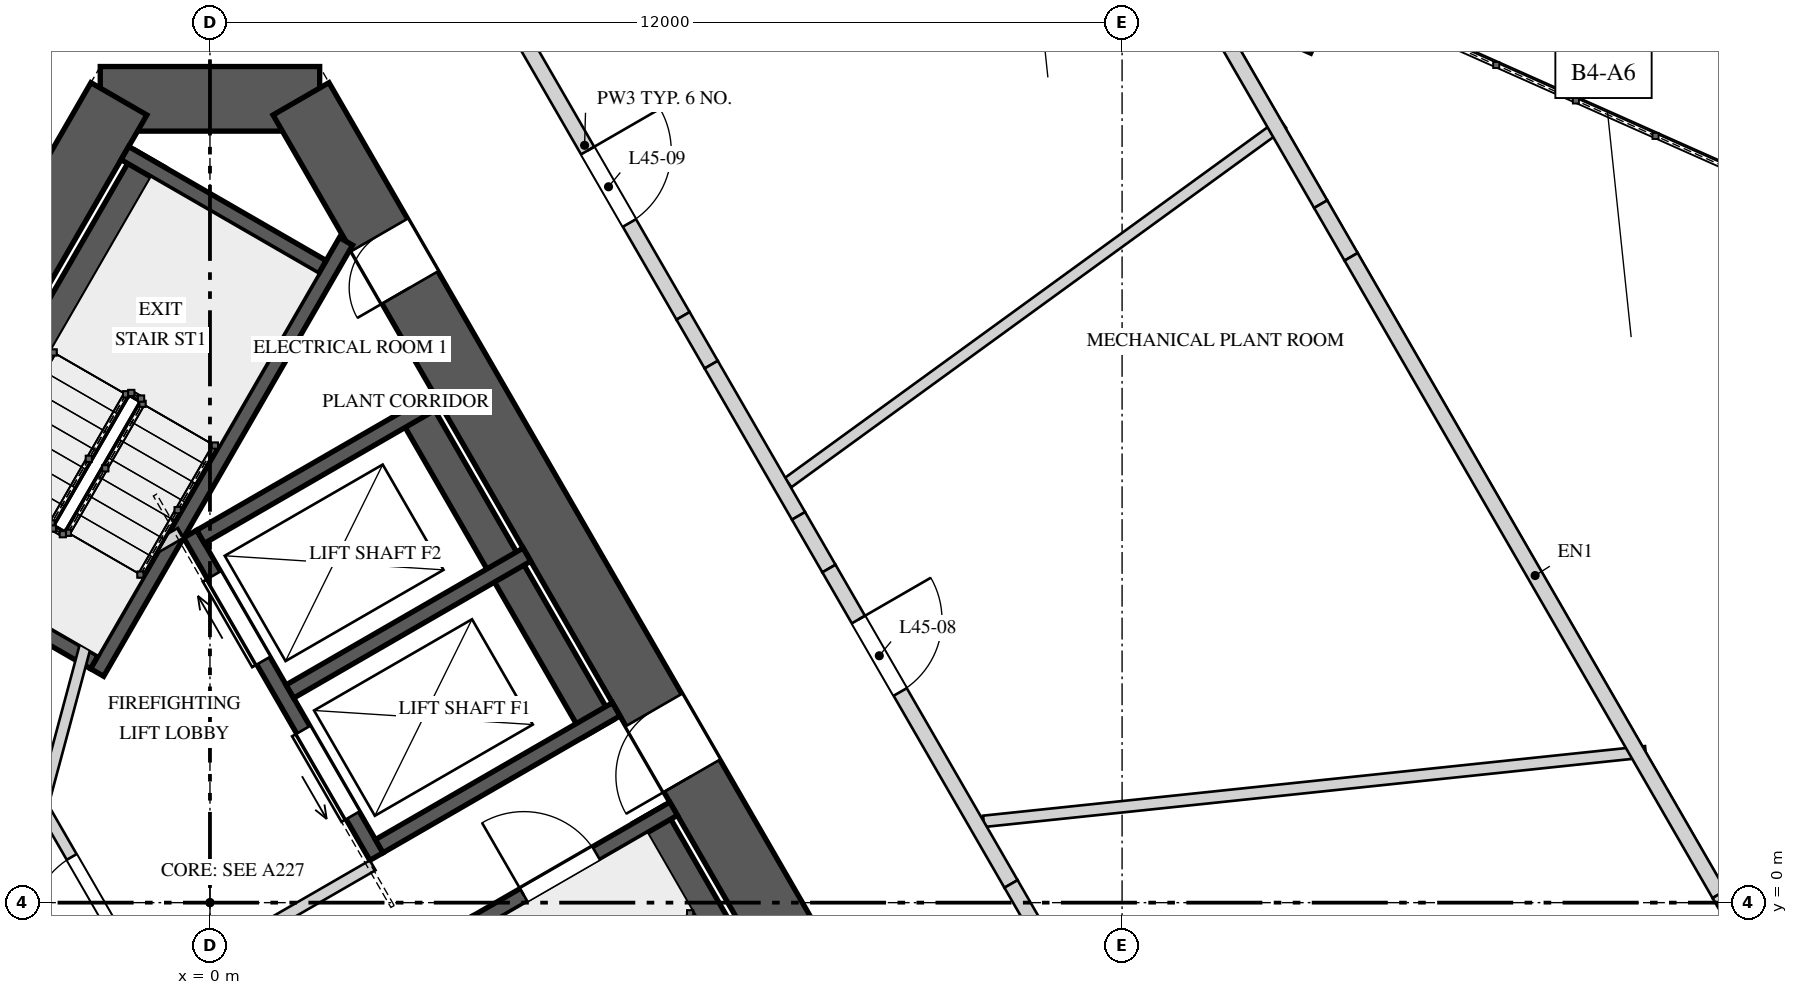
"""IFC4 building model, lengths in metres.
Left out: names, types, materials, properties, quantities, classifications, styles, units other than length and angle.
Written with IfcOpenShell. Run it as: python <this file> out.ifc"""

import sys

from ifc_helpers import new_model, si_unit, direction, frame, frame_2d, origin, origin_2d, place, context, subcontext, project, spatial, rectangle, extrude, element, fill, save


model = new_model("IFC4")
c1 = context("Model", 3, precision=1e-05, world=origin(), true_north=direction((0.0, 1.0)))
c2 = subcontext(c1, "Body", "Model", "MODEL_VIEW")
j1 = project(units=[si_unit("LENGTHUNIT", "METRE"), si_unit("PLANEANGLEUNIT", "RADIAN")], contexts=[c1])
p1 = place(None, origin())
s1 = spatial("IfcSite", under=j1, at=p1, CompositionType="ELEMENT")
p2 = place(p1, origin())
s2 = spatial("IfcBuilding", under=s1, at=p2, CompositionType="ELEMENT")
p3 = place(p2, frame((0.0, 0.0, 194.8)))
s3 = spatial("IfcBuildingStorey", under=s2, at=p3, CompositionType="ELEMENT", Elevation=194.8)
p4 = place(p3, frame((1.443, 10.575, 0.0), z_axis=(0.0, 0.0, 1.0), x_axis=(-1.0, 0.0, 0.0)))
e1 = element("IfcWall", 1, at=p4, inside=s3, PredefinedType="SHEAR", context=c2, shape_type="SweptSolid", body=[
    extrude(rectangle(XDim=2.887, YDim=0.85, at=frame_2d((1.443, 0.0))), origin(), (0.0, 0.0, 1.0), 5.2),
])
p5 = place(p3, frame((-1.198, 10.575, 0.0), z_axis=(0.0, 0.0, 1.0), x_axis=(-0.499995289315, -0.866028123483, 0.0)))
e2 = element("IfcWall", 2, at=p5, inside=s3, PredefinedType="SHEAR", context=c2, shape_type="SweptSolid", body=[
    extrude(rectangle(XDim=17.118, YDim=0.85, at=frame_2d((8.559, 0.0))), origin(), (0.0, 0.0, 1.0), 5.2),
])
p6 = place(p5, frame((6.764, 0.0, 0.0)))
e3 = element("IfcOpeningElement", 3, at=p6, cuts=e2, PredefinedType="OPENING", context=c2, shape_type="SweptSolid", body=[
    extrude(rectangle(XDim=1.0, YDim=2.4, at=frame_2d((0.5, 1.2))), frame((0.0, 0.435, 0.0), z_axis=(0.0, -1.0, 0.0), x_axis=(1.0, 0.0, 0.0)), (0.0, 0.0, 1.0), 0.87),
])
p7 = place(p3, frame((9.757, -4.25, 0.0), z_axis=(0.0, 0.0, 1.0), x_axis=(-0.499995289315, 0.866028123483, 0.0)))
e4 = element("IfcWall", 4, at=p7, inside=s3, PredefinedType="SHEAR", context=c2, shape_type="SweptSolid", body=[
    extrude(rectangle(XDim=17.118, YDim=0.85, at=frame_2d((8.559, 0.0))), origin(), (0.0, 0.0, 1.0), 5.2),
])
p8 = place(p7, frame((6.834, 0.0, 0.0)))
e5 = element("IfcOpeningElement", 5, at=p8, cuts=e4, PredefinedType="OPENING", context=c2, shape_type="SweptSolid", body=[
    extrude(rectangle(XDim=1.0, YDim=2.4, at=frame_2d((0.5, 1.2))), frame((0.0, 0.435, 0.0), z_axis=(0.0, -1.0, 0.0), x_axis=(1.0, 0.0, 0.0)), (0.0, 0.0, 1.0), 0.87),
])
p9 = place(p7, frame((14.252, 0.0, 0.0)))
e6 = element("IfcOpeningElement", 6, at=p9, cuts=e4, PredefinedType="OPENING", context=c2, shape_type="SweptSolid", body=[
    extrude(rectangle(XDim=0.8, YDim=2.1, at=frame_2d((0.4, 1.05))), frame((0.0, 0.435, 0.0), z_axis=(0.0, -1.0, 0.0), x_axis=(1.0, 0.0, 0.0)), (0.0, 0.0, 1.0), 0.87),
])
p10 = place(p3, frame((14.115, 11.832, 0.0), z_axis=(0.0, 0.0, 1.0), x_axis=(-0.913545457643, 0.406736643076, 0.0)))
e7 = element("IfcColumn", 7, at=p10, inside=s3, PredefinedType="COLUMN", context=c2, shape_type="SweptSolid", body=[
    extrude(rectangle(XDim=1.2, YDim=0.9, at=origin_2d()), origin(), (0.0, 0.0, 1.0), 2.835),
])
p11 = place(p3, frame((-0.788, 9.785, 0.0), z_axis=(0.0, 0.0, 1.0), x_axis=(-0.500009909098, -0.866019682689, 0.0)))
e8 = element("IfcWall", 8, at=p11, inside=s3, PredefinedType="SOLIDWALL", context=c2, shape_type="SweptSolid", body=[
    extrude(rectangle(XDim=6.2, YDim=0.45, at=frame_2d((3.1, 0.0))), origin(), (0.0, 0.0, 1.0), 4.85),
])
p12 = place(p3, frame((1.79, 8.7, 0.0), z_axis=(0.0, 0.0, 1.0), x_axis=(-0.499999959354, -0.866025427251, 0.0)))
e9 = element("IfcWall", 9, at=p12, inside=s3, PredefinedType="SOLIDWALL", context=c2, shape_type="SweptSolid", body=[
    extrude(rectangle(XDim=6.549, YDim=0.2, at=frame_2d((3.275, 0.0))), origin(), (0.0, 0.0, 1.0), 4.85),
])
p13 = place(p3, frame((1.479, 8.361, 0.0), z_axis=(0.0, 0.0, 1.0), x_axis=(-0.866031096941, 0.499990139034, 0.0)))
e10 = element("IfcWall", 10, at=p13, inside=s3, PredefinedType="SOLIDWALL", context=c2, shape_type="SweptSolid", body=[
    extrude(rectangle(XDim=3.0, YDim=0.2, at=frame_2d((1.5, 0.0))), origin(), (0.0, 0.0, 1.0), 4.85),
])
p14 = place(p3, frame((-1.521, 3.165, 0.0), z_axis=(0.0, 0.0, 1.0), x_axis=(-0.866031096941, 0.499990139034, 0.0)))
e11 = element("IfcWall", 11, at=p14, inside=s3, PredefinedType="SOLIDWALL", context=c2, shape_type="SweptSolid", body=[
    extrude(rectangle(XDim=3.0, YDim=0.2, at=frame_2d((1.5, 0.0))), origin(), (0.0, 0.0, 1.0), 4.85),
])
p15 = place(p14, frame((0.725, 0.0, 0.0)))
e12 = element("IfcOpeningElement", 12, at=p15, cuts=e11, PredefinedType="OPENING", context=c2, shape_type="SweptSolid", body=[
    extrude(rectangle(XDim=1.1, YDim=2.4, at=frame_2d((0.55, 1.2))), frame((0.0, 0.11, 0.0), z_axis=(0.0, -1.0, 0.0), x_axis=(1.0, 0.0, 0.0)), (0.0, 0.0, 1.0), 0.22),
])
p16 = place(p3, frame((8.868, -4.21, 0.0), z_axis=(0.0, 0.0, 1.0), x_axis=(-0.500009909098, 0.866019682689, 0.0)))
e13 = element("IfcWall", 13, at=p16, inside=s3, PredefinedType="SOLIDWALL", context=c2, shape_type="SweptSolid", body=[
    extrude(rectangle(XDim=6.2, YDim=0.45, at=frame_2d((3.1, 0.0))), origin(), (0.0, 0.0, 1.0), 4.85),
])
p17 = place(p3, frame((3.501, -0.265, 0.0), z_axis=(0.0, 0.0, 1.0), x_axis=(0.866031096941, 0.499990139034, 0.0)))
e14 = element("IfcWall", 14, at=p17, inside=s3, PredefinedType="SOLIDWALL", context=c2, shape_type="SweptSolid", body=[
    extrude(rectangle(XDim=3.0, YDim=0.2, at=frame_2d((1.5, 0.0))), origin(), (0.0, 0.0, 1.0), 4.85),
])
p18 = place(p17, frame((0.725, 0.0, 0.0)))
e15 = element("IfcOpeningElement", 15, at=p18, cuts=e14, PredefinedType="OPENING", context=c2, shape_type="SweptSolid", body=[
    extrude(rectangle(XDim=1.1, YDim=2.4, at=frame_2d((0.55, 1.2))), frame((0.0, 0.11, 0.0), z_axis=(0.0, -1.0, 0.0), x_axis=(1.0, 0.0, 0.0)), (0.0, 0.0, 1.0), 0.22),
])
p19 = place(p3, frame((2.19, 0.606, 0.0), z_axis=(0.0, 0.0, 1.0), x_axis=(-0.500002801628, 0.866023786258, 0.0)))
e16 = element("IfcWall", 16, at=p19, inside=s3, PredefinedType="SOLIDWALL", context=c2, shape_type="SweptSolid", body=[
    extrude(rectangle(XDim=4.9, YDim=0.2, at=frame_2d((2.45, 0.0))), origin(), (0.0, 0.0, 1.0), 4.85),
])
p20 = place(p19, frame((0.625, 0.0, 0.0)))
e17 = element("IfcOpeningElement", 17, at=p20, cuts=e16, PredefinedType="OPENING", context=c2, shape_type="SweptSolid", body=[
    extrude(rectangle(XDim=1.3, YDim=2.1, at=frame_2d((0.65, 1.05))), frame((0.0, 0.11, 0.0), z_axis=(0.0, -1.0, 0.0), x_axis=(1.0, 0.0, 0.0)), (0.0, 0.0, 1.0), 0.22),
])
p21 = place(p19, frame((2.975, 0.0, 0.0)))
e18 = element("IfcOpeningElement", 18, at=p21, cuts=e16, PredefinedType="OPENING", context=c2, shape_type="SweptSolid", body=[
    extrude(rectangle(XDim=1.3, YDim=2.1, at=frame_2d((0.65, 1.05))), frame((0.0, 0.11, 0.0), z_axis=(0.0, -1.0, 0.0), x_axis=(1.0, 0.0, 0.0)), (0.0, 0.0, 1.0), 0.22),
])
p22 = place(p3, frame((5.113, 2.294, 0.0), z_axis=(0.0, 0.0, 1.0), x_axis=(-0.500002801628, 0.866023786258, 0.0)))
e19 = element("IfcWall", 19, at=p22, inside=s3, PredefinedType="SOLIDWALL", context=c2, shape_type="SweptSolid", body=[
    extrude(rectangle(XDim=4.9, YDim=0.45, at=frame_2d((2.45, 0.0))), origin(), (0.0, 0.0, 1.0), 4.85),
])
for number, where, z_axis, x_axis in (
    (20, (2.227, 0.743, 0.0), (0.0, 0.0, 1.0), (0.866, 0.5, 0.0)),
    (21, (1.052, 2.778, 0.0), (0.0, 0.0, 1.0), (0.866, 0.5, 0.0)),
    (22, (-0.123, 4.813, 0.0), (0.0, 0.0, 1.0), (0.866, 0.5, 0.0)),
):
    element("IfcWall", number, at=place(p3, frame(where, z_axis=z_axis, x_axis=x_axis)), inside=s3, PredefinedType="SOLIDWALL", context=c2, shape_type="SweptSolid", body=[
        extrude(rectangle(XDim=3.6, YDim=0.2, at=frame_2d((1.8, 0.0))), origin(), (0.0, 0.0, 1.0), 4.85),
    ])
p23 = place(p3, frame((-0.744, -1.261, 0.0), z_axis=(0.0, 0.0, 1.0), x_axis=(-0.500004234368, 0.866022959057, 0.0)))
e23 = element("IfcWall", 23, at=p23, inside=s3, PredefinedType="PARTITIONING", context=c2, shape_type="SweptSolid", body=[
    extrude(rectangle(XDim=3.125, YDim=0.15, at=frame_2d((1.562, 0.0))), origin(), (0.0, 0.0, 1.0), 4.85),
])
p24 = place(p23, frame((1.05, 0.0, 0.0)))
e24 = element("IfcOpeningElement", 24, at=p24, cuts=e23, PredefinedType="OPENING", context=c2, shape_type="SweptSolid", body=[
    extrude(rectangle(XDim=1.1, YDim=2.4, at=frame_2d((0.55, 1.2))), frame((0.0, 0.085, 0.0), z_axis=(0.0, -1.0, 0.0), x_axis=(1.0, 0.0, 0.0)), (0.0, 0.0, 1.0), 0.17),
])
p25 = place(p3, frame((-0.717, -1.159, 0.0), z_axis=(0.0, 0.0, 1.0), x_axis=(0.866008176907, 0.50002983664, 0.0)))
e25 = element("IfcWall", 25, at=p25, inside=s3, PredefinedType="PARTITIONING", context=c2, shape_type="SweptSolid", body=[
    extrude(rectangle(XDim=3.3, YDim=0.15, at=frame_2d((1.65, 0.0))), origin(), (0.0, 0.0, 1.0), 4.85),
])
p26 = place(p3, frame((-2.178, 1.372, 0.0), z_axis=(0.0, 0.0, 1.0), x_axis=(0.258808958833, 0.96592852884, 0.0)))
e26 = element("IfcWall", 26, at=p26, inside=s3, PredefinedType="PARTITIONING", context=c2, shape_type="SweptSolid", body=[
    extrude(rectangle(XDim=2.903, YDim=0.15, at=frame_2d((1.451, 0.0))), origin(), (0.0, 0.0, 1.0), 4.85),
])
p27 = place(p3, frame((-1.51, 4.215, 0.0), z_axis=(0.0, 0.0, 1.0), x_axis=(0.866085525409, 0.49989585183, 0.0)))
e27 = element("IfcWall", 27, at=p27, inside=s3, PredefinedType="PARTITIONING", context=c2, shape_type="SweptSolid", body=[
    extrude(rectangle(XDim=1.3, YDim=0.15, at=frame_2d((0.65, 0.0))), origin(), (0.0, 0.0, 1.0), 4.85),
])
p28 = place(p3, frame((7.606, 5.526, 0.0), z_axis=(0.0, 0.0, 1.0), x_axis=(0.809027351465, 0.587770996717, 0.0)))
e28 = element("IfcWall", 28, at=p28, inside=s3, PredefinedType="PARTITIONING", context=c2, shape_type="SweptSolid", body=[
    extrude(rectangle(XDim=8.044, YDim=0.15, at=frame_2d((4.022, 0.0))), origin(), (0.0, 0.0, 1.0), 4.85),
])
p29 = place(p3, frame((10.179, 1.07, 0.0), z_axis=(0.0, 0.0, 1.0), x_axis=(0.994523006427, 0.104517891713, 0.0)))
e29 = element("IfcWall", 29, at=p29, inside=s3, PredefinedType="PARTITIONING", context=c2, shape_type="SweptSolid", body=[
    extrude(rectangle(XDim=8.757, YDim=0.15, at=frame_2d((4.378, 0.0))), origin(), (0.0, 0.0, 1.0), 4.85),
])
p30 = place(p3, frame((3.633, 12.207, 0.0), z_axis=(0.0, 0.0, 1.0), x_axis=(0.499990271856, -0.866031020258, 0.0)))
e30 = element("IfcWall", 30, at=p30, inside=s3, PredefinedType="SOLIDWALL", context=c2, shape_type="SweptSolid", body=[
    extrude(rectangle(XDim=5.182, YDim=0.2, at=frame_2d((2.591, 0.0))), origin(), (0.0, 0.0, 1.0), 4.85),
])
p31 = place(p30, frame((2.671, 0.0, 0.0)))
e31 = element("IfcOpeningElement", 31, at=p31, cuts=e30, PredefinedType="OPENING", context=c2, shape_type="SweptSolid", body=[
    extrude(rectangle(XDim=1.1, YDim=2.2, at=frame_2d((0.55, 1.1))), frame((0.0, 0.11, 0.0), z_axis=(0.0, -1.0, 0.0), x_axis=(1.0, 0.0, 0.0)), (0.0, 0.0, 1.0), 0.22),
])
p32 = place(p3, frame((6.224, 7.719, 0.0), z_axis=(0.0, 0.0, 1.0), x_axis=(0.499931655587, -0.866064858854, 0.0)))
e32 = element("IfcWall", 32, at=p32, inside=s3, PredefinedType="SOLIDWALL", context=c2, shape_type="SweptSolid", body=[
    extrude(rectangle(XDim=0.741, YDim=0.2, at=frame_2d((0.37, 0.0))), origin(), (0.0, 0.0, 1.0), 4.15),
])
p33 = place(p3, frame((6.594, 7.078, 0.0), z_axis=(0.0, 0.0, 1.0), x_axis=(0.500013761451, -0.866017458461, 0.0)))
e33 = element("IfcWall", 33, at=p33, inside=s3, PredefinedType="SOLIDWALL", context=c2, shape_type="SweptSolid", body=[
    extrude(rectangle(XDim=2.297, YDim=0.2, at=frame_2d((1.149, 0.0))), origin(), (0.0, 0.0, 1.0), 4.85),
])
p34 = place(p3, frame((7.743, 5.088, 0.0), z_axis=(0.0, 0.0, 1.0), x_axis=(0.500109828528, -0.865961984968, 0.0)))
e34 = element("IfcWall", 34, at=p34, inside=s3, PredefinedType="SOLIDWALL", context=c2, shape_type="SweptSolid", body=[
    extrude(rectangle(XDim=0.8, YDim=0.2, at=frame_2d((0.4, 0.0))), origin(), (0.0, 0.0, 1.0), 3.95),
])
p35 = place(p3, frame((8.143, 4.396, 0.0), z_axis=(0.0, 0.0, 1.0), x_axis=(0.499997407846, -0.86602690036, 0.0)))
e35 = element("IfcWall", 35, at=p35, inside=s3, PredefinedType="SOLIDWALL", context=c2, shape_type="SweptSolid", body=[
    extrude(rectangle(XDim=4.791, YDim=0.2, at=frame_2d((2.396, 0.0))), origin(), (0.0, 0.0, 1.0), 4.85),
])
p36 = place(p35, frame((0.775, 0.0, 0.0)))
e36 = element("IfcOpeningElement", 36, at=p36, cuts=e35, PredefinedType="OPENING", context=c2, shape_type="SweptSolid", body=[
    extrude(rectangle(XDim=1.1, YDim=2.2, at=frame_2d((0.55, 1.1))), frame((0.0, 0.11, 0.0), z_axis=(0.0, -1.0, 0.0), x_axis=(1.0, 0.0, 0.0)), (0.0, 0.0, 1.0), 0.22),
])
p37 = place(p3, frame((10.539, 0.246, 0.0), z_axis=(0.0, 0.0, 1.0), x_axis=(0.499971966783, -0.866041588165, 0.0)))
e37 = element("IfcWall", 37, at=p37, inside=s3, PredefinedType="SOLIDWALL", context=c2, shape_type="SweptSolid", body=[
    extrude(rectangle(XDim=0.932, YDim=0.2, at=frame_2d((0.466, 0.0))), origin(), (0.0, 0.0, 1.0), 3.95),
])
p38 = place(p3, frame((12.774, 12.374, 0.0), z_axis=(0.0, 0.0, 1.0), x_axis=(0.500002145574, -0.866024165033, 0.0)))
e38 = element("IfcWall", 38, at=p38, inside=s3, PredefinedType="SOLIDWALL", context=c2, shape_type="SweptSolid", body=[
    extrude(rectangle(XDim=3.677, YDim=0.2, at=frame_2d((1.839, 0.0))), origin(), (0.0, 0.0, 1.0), 4.85),
])
p39 = place(p3, frame((14.613, 9.189, 0.0), z_axis=(0.0, 0.0, 1.0), x_axis=(0.500109828528, -0.865961984968, 0.0)))
e39 = element("IfcWall", 39, at=p39, inside=s3, PredefinedType="SOLIDWALL", context=c2, shape_type="SweptSolid", body=[
    extrude(rectangle(XDim=0.8, YDim=0.2, at=frame_2d((0.4, 0.0))), origin(), (0.0, 0.0, 1.0), 3.95),
])
p40 = place(p3, frame((15.013, 8.497, 0.0), z_axis=(0.0, 0.0, 1.0), x_axis=(0.499981435953, -0.866036121476, 0.0)))
e40 = element("IfcWall", 40, at=p40, inside=s3, PredefinedType="SOLIDWALL", context=c2, shape_type="SweptSolid", body=[
    extrude(rectangle(XDim=9.683, YDim=0.2, at=frame_2d((4.842, 0.0))), origin(), (0.0, 0.0, 1.0), 4.85),
])
p41 = place(p3, frame((19.855, 0.11, 0.0), z_axis=(0.0, 0.0, 1.0), x_axis=(0.500168465368, -0.865928118409, 0.0)))
e41 = element("IfcWall", 41, at=p41, inside=s3, PredefinedType="SOLIDWALL", context=c2, shape_type="SweptSolid", body=[
    extrude(rectangle(XDim=0.932, YDim=0.2, at=frame_2d((0.466, 0.0))), origin(), (0.0, 0.0, 1.0), 3.95),
])
p42 = place(p18, origin())
e42 = element("IfcDoor", 42, at=p42, inside=s3, OperationType="SINGLE_SWING_RIGHT", PredefinedType="DOOR", context=c2, shape_type="SweptSolid", body=[
    extrude(rectangle(XDim=1.1, YDim=2.4, at=frame_2d((0.55, 1.2))), frame((0.0, 0.025, 0.0), z_axis=(0.0, -1.0, 0.0), x_axis=(1.0, 0.0, 0.0)), (0.0, 0.0, 1.0), 0.05),
])
fill(e15, e42)
p43 = place(p20, origin())
e43 = element("IfcDoor", 43, at=p43, inside=s3, OperationType="SLIDING_TO_LEFT", PredefinedType="DOOR", context=c2, shape_type="SweptSolid", body=[
    extrude(rectangle(XDim=1.3, YDim=2.1, at=frame_2d((0.65, 1.05))), frame((0.0, 0.025, 0.0), z_axis=(0.0, -1.0, 0.0), x_axis=(1.0, 0.0, 0.0)), (0.0, 0.0, 1.0), 0.05),
])
fill(e17, e43)
p44 = place(p21, origin())
e44 = element("IfcDoor", 44, at=p44, inside=s3, OperationType="SLIDING_TO_RIGHT", PredefinedType="DOOR", context=c2, shape_type="SweptSolid", body=[
    extrude(rectangle(XDim=1.3, YDim=2.1, at=frame_2d((0.65, 1.05))), frame((0.0, 0.025, 0.0), z_axis=(0.0, -1.0, 0.0), x_axis=(1.0, 0.0, 0.0)), (0.0, 0.0, 1.0), 0.05),
])
fill(e18, e44)
p45 = place(p24, origin())
e45 = element("IfcDoor", 45, at=p45, inside=s3, OperationType="SINGLE_SWING_LEFT", PredefinedType="DOOR", context=c2, shape_type="SweptSolid", body=[
    extrude(rectangle(XDim=1.1, YDim=2.4, at=frame_2d((0.55, 1.2))), frame((0.0, 0.025, 0.0), z_axis=(0.0, -1.0, 0.0), x_axis=(1.0, 0.0, 0.0)), (0.0, 0.0, 1.0), 0.05),
])
fill(e24, e45)
p46 = place(p8, origin())
e46 = element("IfcDoor", 46, at=p46, inside=s3, OperationType="SINGLE_SWING_RIGHT", PredefinedType="DOOR", context=c2, shape_type="SweptSolid", body=[
    extrude(rectangle(XDim=1.0, YDim=2.4, at=frame_2d((0.5, 1.2))), frame((0.0, 0.025, 0.0), z_axis=(0.0, -1.0, 0.0), x_axis=(1.0, 0.0, 0.0)), (0.0, 0.0, 1.0), 0.05),
])
fill(e5, e46)
p47 = place(p9, origin())
e47 = element("IfcDoor", 47, at=p47, inside=s3, OperationType="SINGLE_SWING_RIGHT", PredefinedType="DOOR", context=c2, shape_type="SweptSolid", body=[
    extrude(rectangle(XDim=0.8, YDim=2.1, at=frame_2d((0.4, 1.05))), frame((0.0, 0.025, 0.0), z_axis=(0.0, -1.0, 0.0), x_axis=(1.0, 0.0, 0.0)), (0.0, 0.0, 1.0), 0.05),
])
fill(e6, e47)
p48 = place(p36, origin())
e48 = element("IfcDoor", 48, at=p48, inside=s3, OperationType="SINGLE_SWING_RIGHT", PredefinedType="DOOR", context=c2, shape_type="SweptSolid", body=[
    extrude(rectangle(XDim=1.1, YDim=2.2, at=frame_2d((0.55, 1.1))), frame((0.0, 0.025, 0.0), z_axis=(0.0, -1.0, 0.0), x_axis=(1.0, 0.0, 0.0)), (0.0, 0.0, 1.0), 0.05),
])
fill(e36, e48)
p49 = place(p31, origin())
e49 = element("IfcDoor", 49, at=p49, inside=s3, OperationType="SINGLE_SWING_LEFT", PredefinedType="DOOR", context=c2, shape_type="SweptSolid", body=[
    extrude(rectangle(XDim=1.1, YDim=2.2, at=frame_2d((0.55, 1.1))), frame((0.0, 0.025, 0.0), z_axis=(0.0, -1.0, 0.0), x_axis=(1.0, 0.0, 0.0)), (0.0, 0.0, 1.0), 0.05),
])
fill(e31, e49)
save(model, sys.argv[1])
